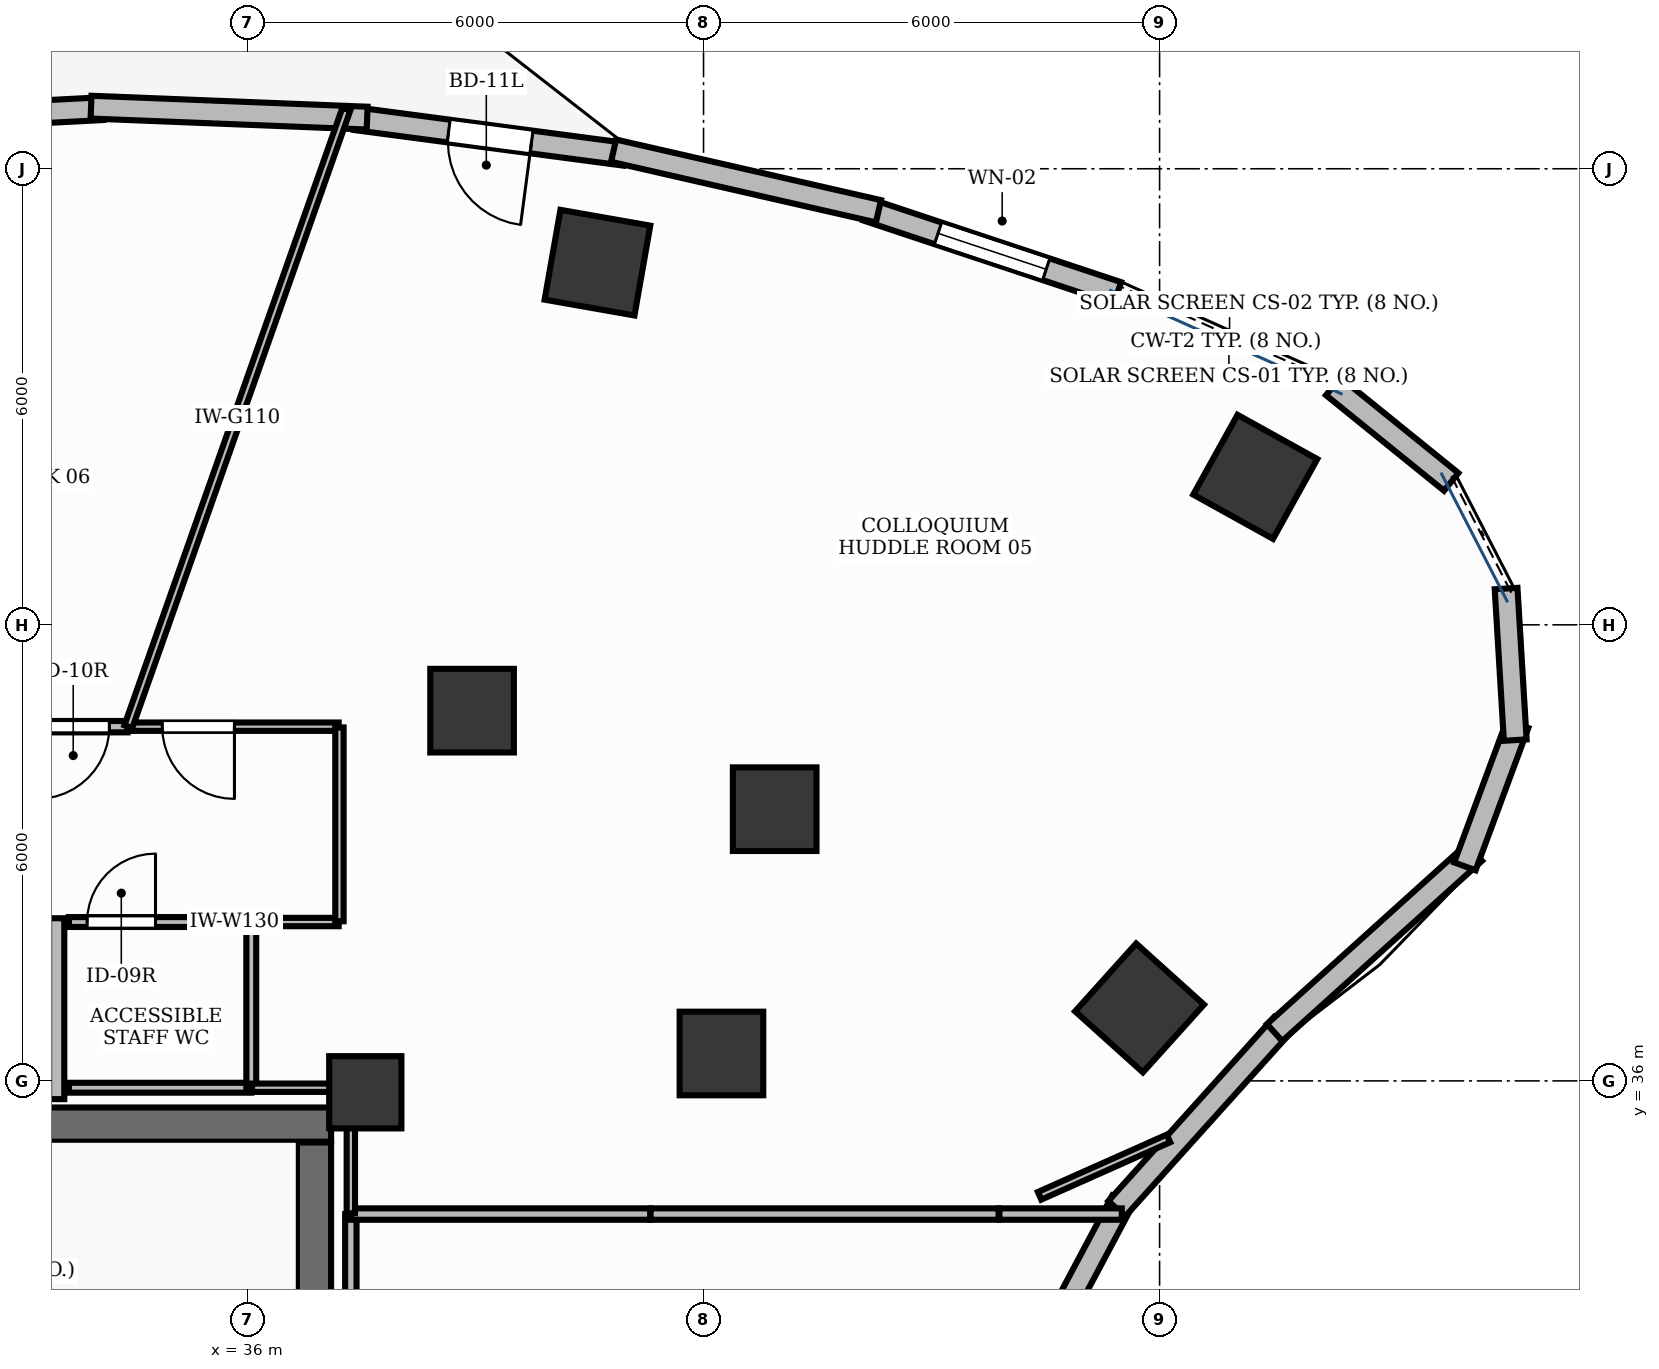
"""IFC4 building model, lengths in metres.
Left out: names, types, materials, properties, quantities, classifications, styles, units other than length and angle.
Written with IfcOpenShell. Run it as: python <this file> out.ifc"""

import sys

from ifc_helpers import new_model, si_unit, direction, frame, frame_2d, origin, origin_2d, place, context, subcontext, project, spatial, rectangle, extrude, element, fill, save


model = new_model("IFC4")
c1 = context("Model", 3, precision=1e-05, world=origin(), true_north=direction((0.0, 1.0)))
c2 = subcontext(c1, "Body", "Model", "MODEL_VIEW")
j1 = project(units=[si_unit("LENGTHUNIT", "METRE"), si_unit("PLANEANGLEUNIT", "RADIAN")], contexts=[c1])
p1 = place(None, origin())
s1 = spatial("IfcSite", under=j1, at=p1, CompositionType="ELEMENT")
p2 = place(p1, origin())
s2 = spatial("IfcBuilding", under=s1, at=p2, CompositionType="ELEMENT")
p3 = place(p2, frame((0.0, 0.0, 132.0)))
s3 = spatial("IfcBuildingStorey", under=s2, at=p3, CompositionType="ELEMENT", Elevation=132.0)
p4 = place(p3, frame((28.852, 35.425, 0.0), z_axis=(0.0, 0.0, 1.0), x_axis=(1.0, 0.0, 0.0)))
e1 = element("IfcWall", 1, at=p4, inside=s3, PredefinedType="SHEAR", context=c2, shape_type="SweptSolid", body=[
    extrude(rectangle(XDim=8.248, YDim=0.45, at=frame_2d((4.124, 0.0))), origin(), (0.0, 0.0, 1.0), 3.9),
])
p5 = place(p3, frame((36.875, 32.11, 0.0), z_axis=(0.0, 0.0, 1.0), x_axis=(0.0, 1.0, 0.0)))
e2 = element("IfcWall", 2, at=p5, inside=s3, PredefinedType="SHEAR", context=c2, shape_type="SweptSolid", body=[
    extrude(rectangle(XDim=3.08, YDim=0.45, at=frame_2d((1.54, 0.0))), origin(), (0.0, 0.0, 1.0), 3.9),
])
p6 = place(p3, frame((37.55, 35.85, -0.0), z_axis=(0.0, 0.0, 1.0), x_axis=(1.0, 0.0, 0.0)))
e3 = element("IfcColumn", 3, at=p6, inside=s3, PredefinedType="PILASTER", context=c2, shape_type="SweptSolid", body=[
    extrude(rectangle(XDim=0.95, YDim=0.95, at=origin_2d()), origin(), (0.0, 0.0, 1.0), 3.901),
])
p7 = place(p3, frame((49.259, 43.947, -0.0), z_axis=(0.0, 0.0, 1.0), x_axis=(-0.874535078577, 0.484962262797, 0.0)))
e4 = element("IfcColumn", 4, at=p7, inside=s3, PredefinedType="COLUMN", context=c2, shape_type="SweptSolid", body=[
    extrude(rectangle(XDim=1.2, YDim=1.2, at=origin_2d()), origin(), (0.0, 0.0, 1.0), 3.901),
])
p8 = place(p3, frame((42.936, 39.575, -0.0), z_axis=(0.0, 0.0, 1.0), x_axis=(1.0, 0.0, 0.0)))
e5 = element("IfcColumn", 5, at=p8, inside=s3, PredefinedType="COLUMN", context=c2, shape_type="SweptSolid", body=[
    extrude(rectangle(XDim=1.1, YDim=1.1, at=origin_2d()), origin(), (0.0, 0.0, 1.0), 3.901),
])
p9 = place(p3, frame((40.604, 46.765, -0.0), z_axis=(0.0, 0.0, 1.0), x_axis=(-0.984868307662, 0.173304404339, 0.0)))
e6 = element("IfcColumn", 6, at=p9, inside=s3, PredefinedType="COLUMN", context=c2, shape_type="SweptSolid", body=[
    extrude(rectangle(XDim=1.2, YDim=1.2, at=origin_2d()), origin(), (0.0, 0.0, 1.0), 3.901),
])
p10 = place(p3, frame((38.955, 40.871, -0.0), z_axis=(0.0, 0.0, 1.0), x_axis=(1.0, 0.0, 0.0)))
e7 = element("IfcColumn", 7, at=p10, inside=s3, PredefinedType="COLUMN", context=c2, shape_type="SweptSolid", body=[
    extrude(rectangle(XDim=1.1, YDim=1.1, at=origin_2d()), origin(), (0.0, 0.0, 1.0), 3.901),
])
p11 = place(p3, frame((47.736, 36.96, -0.0), z_axis=(0.0, 0.0, 1.0), x_axis=(0.669130606359, 0.743144825477, 0.0)))
e8 = element("IfcColumn", 8, at=p11, inside=s3, PredefinedType="COLUMN", context=c2, shape_type="SweptSolid", body=[
    extrude(rectangle(XDim=1.2, YDim=1.2, at=origin_2d()), origin(), (0.0, 0.0, 1.0), 3.901),
])
p12 = place(p3, frame((42.236, 36.361, -0.0), z_axis=(0.0, 0.0, 1.0), x_axis=(1.0, 0.0, 0.0)))
e9 = element("IfcColumn", 9, at=p12, inside=s3, PredefinedType="COLUMN", context=c2, shape_type="SweptSolid", body=[
    extrude(rectangle(XDim=1.1, YDim=1.1, at=origin_2d()), origin(), (0.0, 0.0, 1.0), 3.901),
])
p13 = place(p3, frame((47.446, 46.366, 0.0), z_axis=(0.0, 0.0, 1.0), x_axis=(-0.948949854506, 0.315426970364, 0.0)))
e10 = element("IfcWall", 10, at=p13, inside=s3, PredefinedType="STANDARD", context=c2, shape_type="SweptSolid", body=[
    extrude(rectangle(XDim=3.476, YDim=0.3, at=frame_2d((1.738, 0.0))), origin(), (0.0, 0.0, 1.0), 3.9),
])
p14 = place(p13, frame((0.988, 0.0, 0.95)))
e11 = element("IfcOpeningElement", 11, at=p14, cuts=e10, PredefinedType="OPENING", context=c2, shape_type="SweptSolid", body=[
    extrude(rectangle(XDim=1.5, YDim=1.8, at=frame_2d((0.75, 0.9))), frame((0.0, 0.165, 0.0), z_axis=(0.0, -1.0, 0.0), x_axis=(1.0, 0.0, 0.0)), (0.0, 0.0, 1.0), 0.33),
])
p15 = place(p3, frame((40.964, 48.19, 0.0), z_axis=(0.0, 0.0, 1.0), x_axis=(-0.991369257822, 0.131099178664, 0.0)))
e12 = element("IfcWall", 12, at=p15, inside=s3, PredefinedType="STANDARD", context=c2, shape_type="SweptSolid", body=[
    extrude(rectangle(XDim=3.575, YDim=0.3, at=frame_2d((1.788, 0.0))), origin(), (0.0, 0.0, 1.0), 3.9),
])
p16 = place(p15, frame((1.238, 0.0, 0.0)))
e13 = element("IfcOpeningElement", 13, at=p16, cuts=e12, PredefinedType="OPENING", context=c2, shape_type="SweptSolid", body=[
    extrude(rectangle(XDim=1.1, YDim=2.15, at=frame_2d((0.55, 1.075))), frame((0.0, 0.165, 0.0), z_axis=(0.0, -1.0, 0.0), x_axis=(1.0, 0.0, 0.0)), (0.0, 0.0, 1.0), 0.33),
])
p17 = place(p3, frame((34.096, 48.791, 0.0), z_axis=(0.0, 0.0, 1.0), x_axis=(-0.998676861232, -0.051424963197, 0.0)))
e14 = element("IfcWall", 14, at=p17, inside=s3, PredefinedType="STANDARD", context=c2, shape_type="SweptSolid", body=[
    extrude(rectangle(XDim=3.594, YDim=0.3, at=frame_2d((1.797, 0.0))), origin(), (0.0, 0.0, 1.0), 3.9),
])
p18 = place(p17, frame((1.047, 0.0, 0.95)))
e15 = element("IfcOpeningElement", 15, at=p18, cuts=e14, PredefinedType="OPENING", context=c2, shape_type="SweptSolid", body=[
    extrude(rectangle(XDim=1.5, YDim=1.8, at=frame_2d((0.75, 0.9))), frame((0.0, 0.165, 0.0), z_axis=(0.0, -1.0, 0.0), x_axis=(1.0, 0.0, 0.0)), (0.0, 0.0, 1.0), 0.33),
])
p19 = place(p3, frame((44.302, 47.441, 0.0), z_axis=(0.0, 0.0, 1.0), x_axis=(-0.974841550422, 0.222898971669, 0.0)))
e16 = element("IfcWall", 16, at=p19, inside=s3, PredefinedType="STANDARD", context=c2, shape_type="SweptSolid", body=[
    extrude(rectangle(XDim=3.575, YDim=0.3, at=frame_2d((1.788, 0.0))), origin(), (0.0, 0.0, 1.0), 3.9),
])
p20 = place(p3, frame((37.574, 48.666, 0.0), z_axis=(0.0, 0.0, 1.0), x_axis=(-0.999212076676, 0.039689114679, 0.0)))
e17 = element("IfcWall", 17, at=p20, inside=s3, PredefinedType="STANDARD", context=c2, shape_type="SweptSolid", body=[
    extrude(rectangle(XDim=3.635, YDim=0.3, at=frame_2d((1.818, 0.0))), origin(), (0.0, 0.0, 1.0), 3.9),
])
p21 = place(p3, frame((45.98, 31.547, 0.0), z_axis=(0.0, 0.0, 1.0), x_axis=(0.469451284634, 0.882958374645, 0.0)))
e18 = element("IfcWall", 18, at=p21, inside=s3, PredefinedType="STANDARD", context=c2, shape_type="SweptSolid", body=[
    extrude(rectangle(XDim=3.256, YDim=0.3, at=frame_2d((1.628, 0.0))), origin(), (0.0, 0.0, 1.0), 3.9),
])
p22 = place(p3, frame((47.437, 34.319, 0.0), z_axis=(0.0, 0.0, 1.0), x_axis=(0.669167727967, 0.743111399353, 0.0)))
e19 = element("IfcWall", 19, at=p22, inside=s3, PredefinedType="STANDARD", context=c2, shape_type="SweptSolid", body=[
    extrude(rectangle(XDim=3.255, YDim=0.3, at=frame_2d((1.628, 0.0))), origin(), (0.0, 0.0, 1.0), 3.9),
])
p23 = place(p3, frame((49.513, 36.636, 0.0), z_axis=(0.0, 0.0, 1.0), x_axis=(0.74255963233, 0.669779958221, 0.0)))
e20 = element("IfcWall", 20, at=p23, inside=s3, PredefinedType="STANDARD", context=c2, shape_type="SweptSolid", body=[
    extrude(rectangle(XDim=3.539, YDim=0.3, at=frame_2d((1.77, 0.0))), origin(), (0.0, 0.0, 1.0), 3.9),
])
p24 = place(p3, frame((52.016, 38.822, 0.0), z_axis=(0.0, 0.0, 1.0), x_axis=(0.347370087337, 0.937728117539, 0.0)))
e21 = element("IfcWall", 21, at=p24, inside=s3, PredefinedType="STANDARD", context=c2, shape_type="SweptSolid", body=[
    extrude(rectangle(XDim=1.997, YDim=0.3, at=frame_2d((0.999, 0.0))), origin(), (0.0, 0.0, 1.0), 3.9),
])
for number, where, z_axis, x_axis in (
    (22, (52.679, 40.483, 0.0), (0.0, 0.0, 1.0), (-0.06, 0.998, 0.0)),
    (23, (51.836, 43.881, 0.0), (0.0, 0.0, 1.0), (-0.777, 0.629, 0.0)),
):
    element("IfcWall", number, at=place(p3, frame(where, z_axis=z_axis, x_axis=x_axis)), inside=s3, PredefinedType="STANDARD", context=c2, shape_type="SweptSolid", body=[
        extrude(rectangle(XDim=1.998, YDim=0.3, at=frame_2d((0.999, 0.0))), origin(), (0.0, 0.0, 1.0), 3.9),
    ])
p25 = place(p3, frame((33.49, 35.76, 0.0), z_axis=(0.0, 0.0, 1.0), x_axis=(0.0, 1.0, 0.0)))
e24 = element("IfcWall", 24, at=p25, inside=s3, PredefinedType="PARTITIONING", context=c2, shape_type="SweptSolid", body=[
    extrude(rectangle(XDim=2.38, YDim=0.2, at=frame_2d((1.19, 0.0))), origin(), (0.0, 0.0, 1.0), 2.91),
])
p26 = place(p3, frame((33.65, 38.09, 0.0), z_axis=(0.0, 0.0, 1.0), x_axis=(1.0, 0.0, 0.0)))
e25 = element("IfcWall", 25, at=p26, inside=s3, PredefinedType="PARTITIONING", context=c2, shape_type="SweptSolid", body=[
    extrude(rectangle(XDim=2.4, YDim=0.13, at=frame_2d((1.2, 0.0))), origin(), (0.0, 0.0, 1.0), 2.91),
])
p27 = place(p26, frame((0.24, 0.0, 0.0)))
e26 = element("IfcOpeningElement", 26, at=p27, cuts=e25, PredefinedType="OPENING", context=c2, shape_type="SweptSolid", body=[
    extrude(rectangle(XDim=0.9, YDim=2.15, at=frame_2d((0.45, 1.075))), frame((0.0, 0.08, 0.0), z_axis=(0.0, -1.0, 0.0), x_axis=(1.0, 0.0, 0.0)), (0.0, 0.0, 1.0), 0.16),
])
p28 = place(p3, frame((37.2, 40.66, 0.0), z_axis=(0.0, 0.0, 1.0), x_axis=(-1.0, 0.0, 0.0)))
e27 = element("IfcWall", 27, at=p28, inside=s3, PredefinedType="MOVABLE", context=c2, shape_type="SweptSolid", body=[
    extrude(rectangle(XDim=2.767, YDim=0.11, at=frame_2d((1.384, 0.0))), origin(), (0.0, 0.0, 1.0), 2.91),
])
p29 = place(p28, frame((1.372, 0.0, 0.0)))
e28 = element("IfcOpeningElement", 28, at=p29, cuts=e27, PredefinedType="OPENING", context=c2, shape_type="SweptSolid", body=[
    extrude(rectangle(XDim=0.95, YDim=2.15, at=frame_2d((0.475, 1.075))), frame((0.0, 0.07, 0.0), z_axis=(0.0, -1.0, 0.0), x_axis=(1.0, 0.0, 0.0)), (0.0, 0.0, 1.0), 0.14),
])
p30 = place(p3, frame((34.423, 40.66, 0.0), z_axis=(0.0, 0.0, 1.0), x_axis=(-1.0, 0.0, 0.0)))
e29 = element("IfcWall", 29, at=p30, inside=s3, PredefinedType="PARTITIONING", context=c2, shape_type="SweptSolid", body=[
    extrude(rectangle(XDim=8.037, YDim=0.15, at=frame_2d((4.019, 0.0))), origin(), (0.0, 0.0, 1.0), 2.91),
])
p31 = place(p30, frame((0.24, 0.0, 0.0)))
e30 = element("IfcOpeningElement", 30, at=p31, cuts=e29, PredefinedType="OPENING", context=c2, shape_type="SweptSolid", body=[
    extrude(rectangle(XDim=0.95, YDim=2.15, at=frame_2d((0.475, 1.075))), frame((0.0, 0.09, 0.0), z_axis=(0.0, -1.0, 0.0), x_axis=(1.0, 0.0, 0.0)), (0.0, 0.0, 1.0), 0.18),
])
p32 = place(p3, frame((36.05, 35.91, 0.0), z_axis=(0.0, 0.0, 1.0), x_axis=(-1.0, 0.0, 0.0)))
e31 = element("IfcWall", 31, at=p32, inside=s3, PredefinedType="PARTITIONING", context=c2, shape_type="SweptSolid", body=[
    extrude(rectangle(XDim=2.4, YDim=0.13, at=frame_2d((1.2, 0.0))), origin(), (0.0, 0.0, 1.0), 2.91),
])
p33 = place(p3, frame((36.05, 38.09, 0.0), z_axis=(0.0, 0.0, 1.0), x_axis=(0.0, -1.0, 0.0)))
e32 = element("IfcWall", 32, at=p33, inside=s3, PredefinedType="PARTITIONING", context=c2, shape_type="SweptSolid", body=[
    extrude(rectangle(XDim=2.18, YDim=0.13, at=frame_2d((1.09, 0.0))), origin(), (0.0, 0.0, 1.0), 2.91),
])
p34 = place(p3, frame((41.302, 34.248, 0.0), z_axis=(0.0, 0.0, 1.0), x_axis=(1.0, 0.0, 0.0)))
e33 = element("IfcWall", 33, at=p34, inside=s3, PredefinedType="PARTITIONING", context=c2, shape_type="SweptSolid", body=[
    extrude(rectangle(XDim=4.58, YDim=0.15, at=frame_2d((2.29, 0.0))), origin(), (0.0, 0.0, 1.0), 2.91),
])
p35 = place(p3, frame((45.892, 34.248, 0.0), z_axis=(0.0, 0.0, 1.0), x_axis=(1.0, 0.0, 0.0)))
e34 = element("IfcWall", 34, at=p35, inside=s3, PredefinedType="PARTITIONING", context=c2, shape_type="SweptSolid", body=[
    extrude(rectangle(XDim=1.61, YDim=0.15, at=frame_2d((0.805, 0.0))), origin(), (0.0, 0.0, 1.0), 2.91),
])
p36 = place(p3, frame((37.36, 18.1, 0.0), z_axis=(0.0, 0.0, 1.0), x_axis=(0.0, 1.0, 0.0)))
e35 = element("IfcWall", 35, at=p36, inside=s3, PredefinedType="PARTITIONING", context=c2, shape_type="SweptSolid", body=[
    extrude(rectangle(XDim=16.148, YDim=0.15, at=frame_2d((8.074, 0.0))), origin(), (0.0, 0.0, 1.0), 2.91),
])
p37 = place(p3, frame((37.36, 34.248, 0.0), z_axis=(0.0, 0.0, 1.0), x_axis=(1.0, 0.0, 0.0)))
e36 = element("IfcWall", 36, at=p37, inside=s3, PredefinedType="PARTITIONING", context=c2, shape_type="SweptSolid", body=[
    extrude(rectangle(XDim=3.938, YDim=0.15, at=frame_2d((1.969, 0.0))), origin(), (0.0, 0.0, 1.0), 2.91),
])
p38 = place(p3, frame((48.117, 35.243, 0.0), z_axis=(0.0, 0.0, 1.0), x_axis=(-0.913545637302, -0.406736239553, 0.0)))
e37 = element("IfcWall", 37, at=p38, inside=s3, PredefinedType="MOVABLE", context=c2, shape_type="SweptSolid", body=[
    extrude(rectangle(XDim=1.856, YDim=0.11, at=frame_2d((0.928, 0.0))), origin(), (0.0, 0.0, 1.0), 2.91),
])
p39 = place(p3, frame((37.36, 34.258, 0.0), z_axis=(0.0, 0.0, 1.0), x_axis=(0.0, 1.0, 0.0)))
e38 = element("IfcWall", 38, at=p39, inside=s3, PredefinedType="MOVABLE", context=c2, shape_type="SweptSolid", body=[
    extrude(rectangle(XDim=1.642, YDim=0.11, at=frame_2d((0.821, 0.0))), origin(), (0.0, 0.0, 1.0), 2.91),
])
p40 = place(p3, frame((37.35, 35.91, 0.0), z_axis=(0.0, 0.0, 1.0), x_axis=(-1.0, 0.0, 0.0)))
e39 = element("IfcWall", 39, at=p40, inside=s3, PredefinedType="MOVABLE", context=c2, shape_type="SweptSolid", body=[
    extrude(rectangle(XDim=1.29, YDim=0.11, at=frame_2d((0.645, 0.0))), origin(), (0.0, 0.0, 1.0), 2.91),
])
p41 = place(p3, frame((36.06, 38.09, 0.0), z_axis=(0.0, 0.0, 1.0), x_axis=(1.0, 0.0, 0.0)))
e40 = element("IfcWall", 40, at=p41, inside=s3, PredefinedType="MOVABLE", context=c2, shape_type="SweptSolid", body=[
    extrude(rectangle(XDim=1.14, YDim=0.11, at=frame_2d((0.57, 0.0))), origin(), (0.0, 0.0, 1.0), 2.91),
])
p42 = place(p3, frame((37.21, 38.1, 0.0), z_axis=(0.0, 0.0, 1.0), x_axis=(0.0, 1.0, 0.0)))
e41 = element("IfcWall", 41, at=p42, inside=s3, PredefinedType="MOVABLE", context=c2, shape_type="SweptSolid", body=[
    extrude(rectangle(XDim=2.55, YDim=0.11, at=frame_2d((1.275, 0.0))), origin(), (0.0, 0.0, 1.0), 2.91),
])
p43 = place(p3, frame((34.433, 40.66, 0.0), z_axis=(0.0, 0.0, 1.0), x_axis=(0.332889773539, 0.942965746288, 0.0)))
e42 = element("IfcWall", 42, at=p43, inside=s3, PredefinedType="MOVABLE", context=c2, shape_type="SweptSolid", body=[
    extrude(rectangle(XDim=8.617, YDim=0.11, at=frame_2d((4.308, 0.0))), origin(), (0.0, 0.0, 1.0), 2.91),
])
p44 = place(p14, origin())
e43 = element("IfcWindow", 43, at=p44, inside=s3, PartitioningType="DOUBLE_PANEL_VERTICAL", PredefinedType="WINDOW", context=c2, shape_type="SweptSolid", body=[
    extrude(rectangle(XDim=1.5, YDim=1.8, at=frame_2d((0.75, 0.9))), frame((0.0, 0.03, 0.0), z_axis=(0.0, -1.0, 0.0), x_axis=(1.0, 0.0, 0.0)), (0.0, 0.0, 1.0), 0.06),
])
fill(e11, e43)
p45 = place(p16, origin())
e44 = element("IfcDoor", 44, at=p45, inside=s3, OperationType="SINGLE_SWING_LEFT", PredefinedType="DOOR", context=c2, shape_type="SweptSolid", body=[
    extrude(rectangle(XDim=1.1, YDim=2.15, at=frame_2d((0.55, 1.075))), frame((0.0, 0.025, 0.0), z_axis=(0.0, -1.0, 0.0), x_axis=(1.0, 0.0, 0.0)), (0.0, 0.0, 1.0), 0.05),
])
fill(e13, e44)
p46 = place(p27, origin())
e45 = element("IfcDoor", 45, at=p46, inside=s3, OperationType="SINGLE_SWING_RIGHT", PredefinedType="DOOR", context=c2, shape_type="SweptSolid", body=[
    extrude(rectangle(XDim=0.9, YDim=2.15, at=frame_2d((0.45, 1.075))), frame((0.0, 0.025, 0.0), z_axis=(0.0, -1.0, 0.0), x_axis=(1.0, 0.0, 0.0)), (0.0, 0.0, 1.0), 0.05),
])
fill(e26, e45)
p47 = place(p29, origin())
e46 = element("IfcDoor", 46, at=p47, inside=s3, OperationType="SINGLE_SWING_LEFT", PredefinedType="DOOR", context=c2, shape_type="SweptSolid", body=[
    extrude(rectangle(XDim=0.95, YDim=2.15, at=frame_2d((0.475, 1.075))), frame((0.0, 0.025, 0.0), z_axis=(0.0, -1.0, 0.0), x_axis=(1.0, 0.0, 0.0)), (0.0, 0.0, 1.0), 0.05),
])
fill(e28, e46)
p48 = place(p31, origin())
e47 = element("IfcDoor", 47, at=p48, inside=s3, OperationType="SINGLE_SWING_RIGHT", PredefinedType="DOOR", context=c2, shape_type="SweptSolid", body=[
    extrude(rectangle(XDim=0.95, YDim=2.15, at=frame_2d((0.475, 1.075))), frame((0.0, 0.025, 0.0), z_axis=(0.0, -1.0, 0.0), x_axis=(1.0, 0.0, 0.0)), (0.0, 0.0, 1.0), 0.05),
])
fill(e30, e47)
save(model, sys.argv[1])
